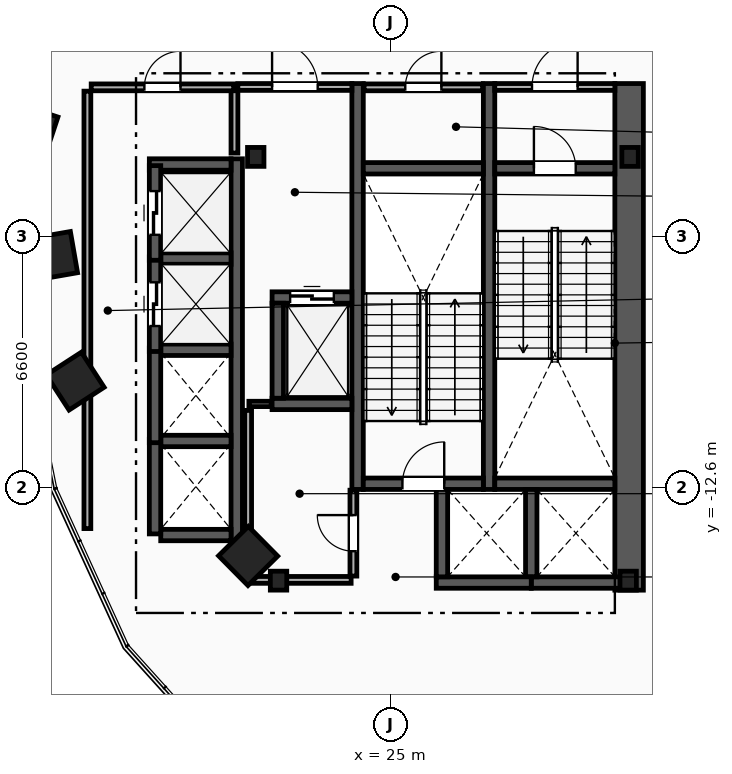
"""IFC4 building model, lengths in metres.
Left out: names, types, materials, properties, quantities, classifications, styles, units other than length and angle.
Written with IfcOpenShell. Run it as: python <this file> out.ifc"""

import sys

from ifc_helpers import new_model, si_unit, direction, frame, frame_2d, origin, origin_2d, place, context, subcontext, project, spatial, rectangle, i_section, extrude, element, fill, save


model = new_model("IFC4")
c1 = context("Model", 3, precision=1e-05, world=origin(), true_north=direction((0.0, 1.0)))
c2 = subcontext(c1, "Body", "Model", "MODEL_VIEW")
j1 = project(units=[si_unit("LENGTHUNIT", "METRE"), si_unit("PLANEANGLEUNIT", "RADIAN")], contexts=[c1])
p1 = place(None, origin())
s1 = spatial("IfcSite", under=j1, at=p1, CompositionType="ELEMENT")
p2 = place(p1, origin())
s2 = spatial("IfcBuilding", under=s1, at=p2, CompositionType="ELEMENT")
p3 = place(p2, frame((0.0, 0.0, 77.2)))
s3 = spatial("IfcBuildingStorey", under=s2, at=p3, CompositionType="ELEMENT", Elevation=77.2)
for number, where, z_axis, x_axis in (
    (1, (31.3, -3.9, 0.0), (0.0, 0.0, 1.0), (1.0, 0.0, 0.0)),
    (2, (21.45, -3.9, 0.0), (0.0, 0.0, 1.0), (1.0, 0.0, 0.0)),
    (3, (22.05, -15.05, 0.0), (0.0, 0.0, 1.0), (1.0, 0.0, 0.0)),
    (4, (31.25, -15.05, 0.0), (0.0, 0.0, 1.0), (1.0, 0.0, 0.0)),
):
    element("IfcColumn", number, at=place(p3, frame(where, z_axis=z_axis, x_axis=x_axis)), inside=s3, PredefinedType="COLUMN", context=c2, shape_type="SweptSolid", body=[
        extrude(i_section(OverallWidth=0.432, OverallDepth=0.498, WebThickness=0.056, FlangeThickness=0.089, FilletRadius=0.018, at=origin_2d()), origin(), (0.0, 0.0, 1.0), 4.6),
    ])
for number, where, z_axis, x_axis in (
    (5, (15.55, -3.2, 0.0), (0.0, 0.0, 1.0), (-0.315, -0.949, 0.0)),
    (6, (16.125, -6.5, 0.0), (0.0, 0.0, 1.0), (0.172, -0.985, 0.0)),
    (7, (16.7, -9.8, 0.0), (0.0, 0.0, 1.0), (0.544, -0.839, 0.0)),
    (8, (21.25, -14.4, 0.0), (0.0, 0.0, 1.0), (0.703, -0.711, 0.0)),
):
    element("IfcColumn", number, at=place(p3, frame(where, z_axis=z_axis, x_axis=x_axis)), inside=s3, PredefinedType="COLUMN", context=c2, shape_type="SweptSolid", body=[
        extrude(rectangle(XDim=1.1, YDim=1.1, at=origin_2d()), origin(), (0.0, 0.0, 1.0), 4.6),
    ])
p4 = place(p3, frame((31.275, -15.3, 0.0), z_axis=(0.0, 0.0, 1.0), x_axis=(0.0, 1.0, 0.0)))
e9 = element("IfcWall", 9, at=p4, inside=s3, PredefinedType="SHEAR", context=c2, shape_type="SweptSolid", body=[
    extrude(rectangle(XDim=13.33, YDim=0.75, at=frame_2d((6.665, 0.0))), origin(), (0.0, 0.0, 1.0), 4.3),
])
for number, where, z_axis, x_axis in (
    (10, (27.59, -12.65, 0.0), (0.0, 0.0, 1.0), (0.0, 1.0, 0.0)),
    (11, (24.13, -12.65, 0.0), (0.0, 0.0, 1.0), (0.0, 1.0, 0.0)),
):
    element("IfcWall", number, at=place(p3, frame(where, z_axis=z_axis, x_axis=x_axis)), inside=s3, PredefinedType="SHEAR", context=c2, shape_type="SweptSolid", body=[
        extrude(rectangle(XDim=10.68, YDim=0.3, at=frame_2d((5.34, 0.0))), origin(), (0.0, 0.0, 1.0), 4.3),
    ])
p5 = place(p3, frame((27.74, -4.2, 0.0), z_axis=(0.0, 0.0, 1.0), x_axis=(1.0, 0.0, 0.0)))
e12 = element("IfcWall", 12, at=p5, inside=s3, PredefinedType="SHEAR", context=c2, shape_type="SweptSolid", body=[
    extrude(rectangle(XDim=3.16, YDim=0.3, at=frame_2d((1.58, 0.0))), origin(), (0.0, 0.0, 1.0), 4.3),
])
p6 = place(p5, frame((1.03, 0.0, 0.0)))
e13 = element("IfcOpeningElement", 13, at=p6, cuts=e12, PredefinedType="OPENING", context=c2, shape_type="SweptSolid", body=[
    extrude(rectangle(XDim=1.1, YDim=2.15, at=frame_2d((0.55, 1.075))), frame((0.0, 0.16, 0.0), z_axis=(0.0, -1.0, 0.0), x_axis=(1.0, 0.0, 0.0)), (0.0, 0.0, 1.0), 0.32),
])
p7 = place(p3, frame((27.74, -12.5, 0.0), z_axis=(0.0, 0.0, 1.0), x_axis=(1.0, 0.0, 0.0)))
e14 = element("IfcWall", 14, at=p7, inside=s3, PredefinedType="SHEAR", context=c2, shape_type="SweptSolid", body=[
    extrude(rectangle(XDim=3.16, YDim=0.3, at=frame_2d((1.58, 0.0))), origin(), (0.0, 0.0, 1.0), 4.3),
])
p8 = place(p3, frame((24.28, -12.5, 0.0), z_axis=(0.0, 0.0, 1.0), x_axis=(1.0, 0.0, 0.0)))
e15 = element("IfcWall", 15, at=p8, inside=s3, PredefinedType="SHEAR", context=c2, shape_type="SweptSolid", body=[
    extrude(rectangle(XDim=3.16, YDim=0.3, at=frame_2d((1.58, 0.0))), origin(), (0.0, 0.0, 1.0), 4.3),
])
p9 = place(p8, frame((1.03, 0.0, 0.0)))
e16 = element("IfcOpeningElement", 16, at=p9, cuts=e15, PredefinedType="OPENING", context=c2, shape_type="SweptSolid", body=[
    extrude(rectangle(XDim=1.1, YDim=2.15, at=frame_2d((0.55, 1.075))), frame((0.0, 0.16, 0.0), z_axis=(0.0, -1.0, 0.0), x_axis=(1.0, 0.0, 0.0)), (0.0, 0.0, 1.0), 0.32),
])
p10 = place(p3, frame((24.28, -4.2, 0.0), z_axis=(0.0, 0.0, 1.0), x_axis=(1.0, 0.0, 0.0)))
e17 = element("IfcWall", 17, at=p10, inside=s3, PredefinedType="SHEAR", context=c2, shape_type="SweptSolid", body=[
    extrude(rectangle(XDim=3.16, YDim=0.3, at=frame_2d((1.58, 0.0))), origin(), (0.0, 0.0, 1.0), 4.3),
])
p11 = place(p3, frame((20.89, -3.8, 0.0), z_axis=(0.0, 0.0, 1.0), x_axis=(0.0, 1.0, 0.0)))
e18 = element("IfcWall", 18, at=p11, inside=s3, PredefinedType="PARTITIONING", context=c2, shape_type="SweptSolid", body=[
    extrude(rectangle(XDim=1.65, YDim=0.18, at=frame_2d((0.825, 0.0))), origin(), (0.0, 0.0, 1.0), 4.3),
])
p12 = place(p3, frame((20.98, -2.06, 0.0), z_axis=(0.0, 0.0, 1.0), x_axis=(1.0, 0.0, 0.0)))
e19 = element("IfcWall", 19, at=p12, inside=s3, PredefinedType="PARTITIONING", context=c2, shape_type="SweptSolid", body=[
    extrude(rectangle(XDim=3.0, YDim=0.18, at=frame_2d((1.5, 0.0))), origin(), (0.0, 0.0, 1.0), 4.3),
])
p13 = place(p12, frame((0.9, 0.0, 0.0)))
e20 = element("IfcOpeningElement", 20, at=p13, cuts=e19, PredefinedType="OPENING", context=c2, shape_type="SweptSolid", body=[
    extrude(rectangle(XDim=1.2, YDim=2.15, at=frame_2d((0.6, 1.075))), frame((0.0, 0.1, 0.0), z_axis=(0.0, -1.0, 0.0), x_axis=(1.0, 0.0, 0.0)), (0.0, 0.0, 1.0), 0.2),
])
p14 = place(p3, frame((27.74, -2.06, 0.0), z_axis=(0.0, 0.0, 1.0), x_axis=(1.0, 0.0, 0.0)))
e21 = element("IfcWall", 21, at=p14, inside=s3, PredefinedType="PARTITIONING", context=c2, shape_type="SweptSolid", body=[
    extrude(rectangle(XDim=3.16, YDim=0.18, at=frame_2d((1.58, 0.0))), origin(), (0.0, 0.0, 1.0), 4.3),
])
p15 = place(p14, frame((0.98, 0.0, 0.0)))
e22 = element("IfcOpeningElement", 22, at=p15, cuts=e21, PredefinedType="OPENING", context=c2, shape_type="SweptSolid", body=[
    extrude(rectangle(XDim=1.2, YDim=2.15, at=frame_2d((0.6, 1.075))), frame((0.0, 0.1, 0.0), z_axis=(0.0, -1.0, 0.0), x_axis=(1.0, 0.0, 0.0)), (0.0, 0.0, 1.0), 0.2),
])
p16 = place(p3, frame((21.88, -7.6, 0.0), z_axis=(0.0, 0.0, 1.0), x_axis=(1.0, 0.0, 0.0)))
e23 = element("IfcWall", 23, at=p16, inside=s3, PredefinedType="SHEAR", context=c2, shape_type="SweptSolid", body=[
    extrude(rectangle(XDim=2.1, YDim=0.3, at=frame_2d((1.05, 0.0))), origin(), (0.0, 0.0, 1.0), 4.3),
])
p17 = place(p16, frame((0.475, 0.0, 0.0)))
e24 = element("IfcOpeningElement", 24, at=p17, cuts=e23, PredefinedType="OPENING", context=c2, shape_type="SweptSolid", body=[
    extrude(rectangle(XDim=1.15, YDim=2.2, at=frame_2d((0.575, 1.1))), frame((0.0, 0.16, 0.0), z_axis=(0.0, -1.0, 0.0), x_axis=(1.0, 0.0, 0.0)), (0.0, 0.0, 1.0), 0.32),
])
p18 = place(p3, frame((21.88, -10.4, 0.0), z_axis=(0.0, 0.0, 1.0), x_axis=(1.0, 0.0, 0.0)))
e25 = element("IfcWall", 25, at=p18, inside=s3, PredefinedType="SHEAR", context=c2, shape_type="SweptSolid", body=[
    extrude(rectangle(XDim=2.1, YDim=0.3, at=frame_2d((1.05, 0.0))), origin(), (0.0, 0.0, 1.0), 4.3),
])
for number, where, z_axis, x_axis in (
    (26, (22.03, -10.25, 0.0), (0.0, 0.0, 1.0), (0.0, 1.0, 0.0)),
    (27, (28.7, -15.1, 0.0), (0.0, 0.0, 1.0), (1.0, 0.0, 0.0)),
):
    element("IfcWall", number, at=place(p3, frame(where, z_axis=z_axis, x_axis=x_axis)), inside=s3, PredefinedType="SHEAR", context=c2, shape_type="SweptSolid", body=[
        extrude(rectangle(XDim=2.5, YDim=0.3, at=frame_2d((1.25, 0.0))), origin(), (0.0, 0.0, 1.0), 4.3),
    ])
p19 = place(p3, frame((28.7, -14.95, 0.0), z_axis=(0.0, 0.0, 1.0), x_axis=(0.0, 1.0, 0.0)))
e28 = element("IfcWall", 28, at=p19, inside=s3, PredefinedType="SHEAR", context=c2, shape_type="SweptSolid", body=[
    extrude(rectangle(XDim=2.3, YDim=0.3, at=frame_2d((1.15, 0.0))), origin(), (0.0, 0.0, 1.0), 4.3),
])
p20 = place(p3, frame((26.2, -15.1, 0.0), z_axis=(0.0, 0.0, 1.0), x_axis=(1.0, 0.0, 0.0)))
e29 = element("IfcWall", 29, at=p20, inside=s3, PredefinedType="SHEAR", context=c2, shape_type="SweptSolid", body=[
    extrude(rectangle(XDim=2.5, YDim=0.3, at=frame_2d((1.25, 0.0))), origin(), (0.0, 0.0, 1.0), 4.3),
])
p21 = place(p3, frame((26.35, -14.95, 0.0), z_axis=(0.0, 0.0, 1.0), x_axis=(0.0, 1.0, 0.0)))
e30 = element("IfcWall", 30, at=p21, inside=s3, PredefinedType="SHEAR", context=c2, shape_type="SweptSolid", body=[
    extrude(rectangle(XDim=2.3, YDim=0.3, at=frame_2d((1.15, 0.0))), origin(), (0.0, 0.0, 1.0), 4.3),
])
p22 = place(p3, frame((20.95, -14.0, 0.0), z_axis=(0.0, 0.0, 1.0), x_axis=(0.0, 1.0, 0.0)))
e31 = element("IfcWall", 31, at=p22, inside=s3, PredefinedType="SHEAR", context=c2, shape_type="SweptSolid", body=[
    extrude(rectangle(XDim=10.05, YDim=0.3, at=frame_2d((5.025, 0.0))), origin(), (0.0, 0.0, 1.0), 4.3),
])
p23 = place(p3, frame((18.95, -13.85, 0.0), z_axis=(0.0, 0.0, 1.0), x_axis=(1.0, 0.0, 0.0)))
e32 = element("IfcWall", 32, at=p23, inside=s3, PredefinedType="SHEAR", context=c2, shape_type="SweptSolid", body=[
    extrude(rectangle(XDim=1.85, YDim=0.3, at=frame_2d((0.925, 0.0))), origin(), (0.0, 0.0, 1.0), 4.3),
])
p24 = place(p3, frame((18.65, -4.1, 0.0), z_axis=(0.0, 0.0, 1.0), x_axis=(1.0, 0.0, 0.0)))
e33 = element("IfcWall", 33, at=p24, inside=s3, PredefinedType="SHEAR", context=c2, shape_type="SweptSolid", body=[
    extrude(rectangle(XDim=2.15, YDim=0.3, at=frame_2d((1.075, 0.0))), origin(), (0.0, 0.0, 1.0), 4.3),
])
for number, where, z_axis, x_axis in (
    (34, (18.95, -11.375, 0.0), (0.0, 0.0, 1.0), (1.0, 0.0, 0.0)),
    (35, (18.95, -8.975, 0.0), (0.0, 0.0, 1.0), (1.0, 0.0, 0.0)),
    (36, (18.95, -6.575, 0.0), (0.0, 0.0, 1.0), (1.0, 0.0, 0.0)),
):
    element("IfcWall", number, at=place(p3, frame(where, z_axis=z_axis, x_axis=x_axis)), inside=s3, PredefinedType="SHEAR", context=c2, shape_type="SweptSolid", body=[
        extrude(rectangle(XDim=1.85, YDim=0.3, at=frame_2d((0.925, 0.0))), origin(), (0.0, 0.0, 1.0), 4.3),
    ])
for number, where, z_axis, x_axis in (
    (37, (18.8, -13.82, 0.0), (0.0, 0.0, 1.0), (0.0, 1.0, 0.0)),
    (38, (18.8, -11.42, 0.0), (0.0, 0.0, 1.0), (0.0, 1.0, 0.0)),
):
    element("IfcWall", number, at=place(p3, frame(where, z_axis=z_axis, x_axis=x_axis)), inside=s3, PredefinedType="SHEAR", context=c2, shape_type="SweptSolid", body=[
        extrude(rectangle(XDim=2.49, YDim=0.3, at=frame_2d((1.245, 0.0))), origin(), (0.0, 0.0, 1.0), 4.3),
    ])
p25 = place(p3, frame((18.8, -9.02, 0.0), z_axis=(0.0, 0.0, 1.0), x_axis=(0.0, 1.0, 0.0)))
e39 = element("IfcWall", 39, at=p25, inside=s3, PredefinedType="SHEAR", context=c2, shape_type="SweptSolid", body=[
    extrude(rectangle(XDim=2.49, YDim=0.3, at=frame_2d((1.245, 0.0))), origin(), (0.0, 0.0, 1.0), 4.3),
])
p26 = place(p25, frame((0.67, 0.0, 0.0)))
e40 = element("IfcOpeningElement", 40, at=p26, cuts=e39, PredefinedType="OPENING", context=c2, shape_type="SweptSolid", body=[
    extrude(rectangle(XDim=1.15, YDim=2.2, at=frame_2d((0.575, 1.1))), frame((0.0, 0.16, 0.0), z_axis=(0.0, -1.0, 0.0), x_axis=(1.0, 0.0, 0.0)), (0.0, 0.0, 1.0), 0.32),
])
p27 = place(p3, frame((18.8, -6.62, 0.0), z_axis=(0.0, 0.0, 1.0), x_axis=(0.0, 1.0, 0.0)))
e41 = element("IfcWall", 41, at=p27, inside=s3, PredefinedType="SHEAR", context=c2, shape_type="SweptSolid", body=[
    extrude(rectangle(XDim=2.49, YDim=0.3, at=frame_2d((1.245, 0.0))), origin(), (0.0, 0.0, 1.0), 4.3),
])
p28 = place(p27, frame((0.67, 0.0, 0.0)))
e42 = element("IfcOpeningElement", 42, at=p28, cuts=e41, PredefinedType="OPENING", context=c2, shape_type="SweptSolid", body=[
    extrude(rectangle(XDim=1.15, YDim=2.2, at=frame_2d((0.575, 1.1))), frame((0.0, 0.16, 0.0), z_axis=(0.0, -1.0, 0.0), x_axis=(1.0, 0.0, 0.0)), (0.0, 0.0, 1.0), 0.32),
])
p29 = place(p3, frame((17.02, -13.68, 0.0), z_axis=(0.0, 0.0, 1.0), x_axis=(0.0, 1.0, 0.0)))
e43 = element("IfcWall", 43, at=p29, inside=s3, PredefinedType="PARTITIONING", context=c2, shape_type="SweptSolid", body=[
    extrude(rectangle(XDim=11.51, YDim=0.18, at=frame_2d((5.755, 0.0))), origin(), (0.0, 0.0, 1.0), 4.3),
])
p30 = place(p3, frame((17.12, -2.07, 0.0), z_axis=(0.0, 0.0, 1.0), x_axis=(1.0, 0.0, 0.0)))
e44 = element("IfcWall", 44, at=p30, inside=s3, PredefinedType="PARTITIONING", context=c2, shape_type="SweptSolid", body=[
    extrude(rectangle(XDim=3.75, YDim=0.18, at=frame_2d((1.875, 0.0))), origin(), (0.0, 0.0, 1.0), 4.3),
])
p31 = place(p30, frame((1.4, 0.0, 0.0)))
e45 = element("IfcOpeningElement", 45, at=p31, cuts=e44, PredefinedType="OPENING", context=c2, shape_type="SweptSolid", body=[
    extrude(rectangle(XDim=0.95, YDim=2.1, at=frame_2d((0.475, 1.05))), frame((0.0, 0.1, 0.0), z_axis=(0.0, -1.0, 0.0), x_axis=(1.0, 0.0, 0.0)), (0.0, 0.0, 1.0), 0.2),
])
p32 = place(p3, frame((21.27, -10.4, 0.0), z_axis=(0.0, 0.0, 1.0), x_axis=(1.0, 0.0, 0.0)))
e46 = element("IfcWall", 46, at=p32, inside=s3, PredefinedType="PARTITIONING", context=c2, shape_type="SweptSolid", body=[
    extrude(rectangle(XDim=0.59, YDim=0.14, at=frame_2d((0.295, 0.0))), origin(), (0.0, 0.0, 1.0), 4.3),
])
p33 = place(p3, frame((21.25, -14.93, 0.0), z_axis=(0.0, 0.0, 1.0), x_axis=(0.0, 1.0, 0.0)))
e47 = element("IfcWall", 47, at=p33, inside=s3, PredefinedType="PARTITIONING", context=c2, shape_type="SweptSolid", body=[
    extrude(rectangle(XDim=4.36, YDim=0.18, at=frame_2d((2.18, 0.0))), origin(), (0.0, 0.0, 1.0), 4.3),
])
p34 = place(p3, frame((21.35, -15.03, 0.0), z_axis=(0.0, 0.0, 1.0), x_axis=(1.0, 0.0, 0.0)))
e48 = element("IfcWall", 48, at=p34, inside=s3, PredefinedType="PARTITIONING", context=c2, shape_type="SweptSolid", body=[
    extrude(rectangle(XDim=2.61, YDim=0.18, at=frame_2d((1.305, 0.0))), origin(), (0.0, 0.0, 1.0), 3.373),
])
p35 = place(p3, frame((24.3, -2.07, 0.0), z_axis=(0.0, 0.0, 1.0), x_axis=(1.0, 0.0, 0.0)))
e49 = element("IfcWall", 49, at=p35, inside=s3, PredefinedType="PARTITIONING", context=c2, shape_type="SweptSolid", body=[
    extrude(rectangle(XDim=3.12, YDim=0.18, at=frame_2d((1.56, 0.0))), origin(), (0.0, 0.0, 1.0), 4.3),
])
p36 = place(p35, frame((1.085, 0.0, 0.0)))
e50 = element("IfcOpeningElement", 50, at=p36, cuts=e49, PredefinedType="OPENING", context=c2, shape_type="SweptSolid", body=[
    extrude(rectangle(XDim=0.95, YDim=2.1, at=frame_2d((0.475, 1.05))), frame((0.0, 0.1, 0.0), z_axis=(0.0, -1.0, 0.0), x_axis=(1.0, 0.0, 0.0)), (0.0, 0.0, 1.0), 0.2),
])
p37 = place(p3, frame((24.02, -14.93, 0.0), z_axis=(0.0, 0.0, 1.0), x_axis=(0.0, 1.0, 0.0)))
e51 = element("IfcWall", 51, at=p37, inside=s3, PredefinedType="PARTITIONING", context=c2, shape_type="SweptSolid", body=[
    extrude(rectangle(XDim=2.26, YDim=0.18, at=frame_2d((1.13, 0.0))), origin(), (0.0, 0.0, 1.0), 4.3),
])
p38 = place(p37, frame((0.655, 0.0, 0.0)))
e52 = element("IfcOpeningElement", 52, at=p38, cuts=e51, PredefinedType="OPENING", context=c2, shape_type="SweptSolid", body=[
    extrude(rectangle(XDim=0.95, YDim=2.1, at=frame_2d((0.475, 1.05))), frame((0.0, 0.1, 0.0), z_axis=(0.0, -1.0, 0.0), x_axis=(1.0, 0.0, 0.0)), (0.0, 0.0, 1.0), 0.2),
])
p39 = place(p6, origin())
e53 = element("IfcDoor", 53, at=p39, inside=s3, OperationType="SINGLE_SWING_LEFT", PredefinedType="DOOR", context=c2, shape_type="SweptSolid", body=[
    extrude(rectangle(XDim=1.1, YDim=2.15, at=frame_2d((0.55, 1.075))), frame((0.0, 0.025, 0.0), z_axis=(0.0, -1.0, 0.0), x_axis=(1.0, 0.0, 0.0)), (0.0, 0.0, 1.0), 0.05),
])
fill(e13, e53)
p40 = place(p9, origin())
e54 = element("IfcDoor", 54, at=p40, inside=s3, OperationType="SINGLE_SWING_RIGHT", PredefinedType="DOOR", context=c2, shape_type="SweptSolid", body=[
    extrude(rectangle(XDim=1.1, YDim=2.15, at=frame_2d((0.55, 1.075))), frame((0.0, 0.025, 0.0), z_axis=(0.0, -1.0, 0.0), x_axis=(1.0, 0.0, 0.0)), (0.0, 0.0, 1.0), 0.05),
])
fill(e16, e54)
p41 = place(p13, origin())
e55 = element("IfcDoor", 55, at=p41, inside=s3, OperationType="SINGLE_SWING_LEFT", PredefinedType="DOOR", context=c2, shape_type="SweptSolid", body=[
    extrude(rectangle(XDim=1.2, YDim=2.15, at=frame_2d((0.6, 1.075))), frame((0.0, 0.025, 0.0), z_axis=(0.0, -1.0, 0.0), x_axis=(1.0, 0.0, 0.0)), (0.0, 0.0, 1.0), 0.05),
])
fill(e20, e55)
p42 = place(p15, origin())
e56 = element("IfcDoor", 56, at=p42, inside=s3, OperationType="SINGLE_SWING_RIGHT", PredefinedType="DOOR", context=c2, shape_type="SweptSolid", body=[
    extrude(rectangle(XDim=1.2, YDim=2.15, at=frame_2d((0.6, 1.075))), frame((0.0, 0.025, 0.0), z_axis=(0.0, -1.0, 0.0), x_axis=(1.0, 0.0, 0.0)), (0.0, 0.0, 1.0), 0.05),
])
fill(e22, e56)
p43 = place(p17, origin())
e57 = element("IfcDoor", 57, at=p43, inside=s3, OperationType="SLIDING_TO_LEFT", PredefinedType="TRAPDOOR", context=c2, shape_type="SweptSolid", body=[
    extrude(rectangle(XDim=1.15, YDim=2.2, at=frame_2d((0.575, 1.1))), frame((0.0, 0.025, 0.0), z_axis=(0.0, -1.0, 0.0), x_axis=(1.0, 0.0, 0.0)), (0.0, 0.0, 1.0), 0.05),
])
fill(e24, e57)
p44 = place(p26, origin())
e58 = element("IfcDoor", 58, at=p44, inside=s3, OperationType="SLIDING_TO_LEFT", PredefinedType="TRAPDOOR", context=c2, shape_type="SweptSolid", body=[
    extrude(rectangle(XDim=1.15, YDim=2.2, at=frame_2d((0.575, 1.1))), frame((0.0, 0.025, 0.0), z_axis=(0.0, -1.0, 0.0), x_axis=(1.0, 0.0, 0.0)), (0.0, 0.0, 1.0), 0.05),
])
fill(e40, e58)
p45 = place(p28, origin())
e59 = element("IfcDoor", 59, at=p45, inside=s3, OperationType="SLIDING_TO_LEFT", PredefinedType="TRAPDOOR", context=c2, shape_type="SweptSolid", body=[
    extrude(rectangle(XDim=1.15, YDim=2.2, at=frame_2d((0.575, 1.1))), frame((0.0, 0.025, 0.0), z_axis=(0.0, -1.0, 0.0), x_axis=(1.0, 0.0, 0.0)), (0.0, 0.0, 1.0), 0.05),
])
fill(e42, e59)
p46 = place(p31, origin())
e60 = element("IfcDoor", 60, at=p46, inside=s3, OperationType="SINGLE_SWING_RIGHT", PredefinedType="DOOR", context=c2, shape_type="SweptSolid", body=[
    extrude(rectangle(XDim=0.95, YDim=2.1, at=frame_2d((0.475, 1.05))), frame((0.0, 0.025, 0.0), z_axis=(0.0, -1.0, 0.0), x_axis=(1.0, 0.0, 0.0)), (0.0, 0.0, 1.0), 0.05),
])
fill(e45, e60)
p47 = place(p36, origin())
e61 = element("IfcDoor", 61, at=p47, inside=s3, OperationType="SINGLE_SWING_RIGHT", PredefinedType="DOOR", context=c2, shape_type="SweptSolid", body=[
    extrude(rectangle(XDim=0.95, YDim=2.1, at=frame_2d((0.475, 1.05))), frame((0.0, 0.025, 0.0), z_axis=(0.0, -1.0, 0.0), x_axis=(1.0, 0.0, 0.0)), (0.0, 0.0, 1.0), 0.05),
])
fill(e50, e61)
p48 = place(p38, origin())
e62 = element("IfcDoor", 62, at=p48, inside=s3, OperationType="SINGLE_SWING_RIGHT", PredefinedType="DOOR", context=c2, shape_type="SweptSolid", body=[
    extrude(rectangle(XDim=0.95, YDim=2.1, at=frame_2d((0.475, 1.05))), frame((0.0, 0.025, 0.0), z_axis=(0.0, -1.0, 0.0), x_axis=(1.0, 0.0, 0.0)), (0.0, 0.0, 1.0), 0.05),
])
fill(e52, e62)
save(model, sys.argv[1])
